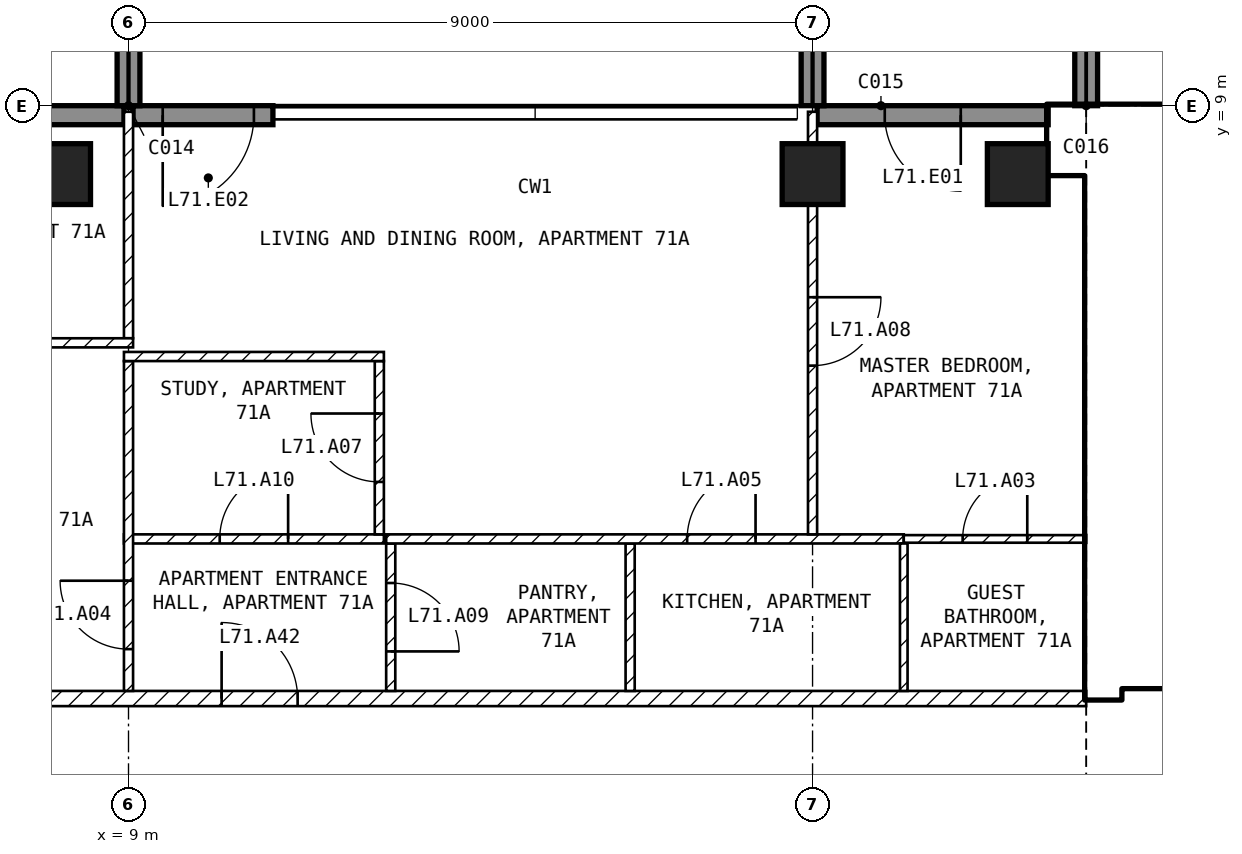
"""IFC4 building model, lengths in metres.
Left out: names, types, materials, properties, quantities, classifications, styles, units other than length and angle.
Written with IfcOpenShell. Run it as: python <this file> out.ifc"""

import sys

from ifc_helpers import new_model, si_unit, direction, frame, frame_2d, origin, origin_2d, place, context, subcontext, project, spatial, rectangle, extrude, element, fill, save


model = new_model("IFC4")
c1 = context("Model", 3, precision=1e-05, world=origin(), true_north=direction((0.0, 1.0)))
c2 = subcontext(c1, "Body", "Model", "MODEL_VIEW")
j1 = project(units=[si_unit("LENGTHUNIT", "METRE"), si_unit("PLANEANGLEUNIT", "RADIAN")], contexts=[c1])
p1 = place(None, origin())
s1 = spatial("IfcSite", under=j1, at=p1, CompositionType="ELEMENT")
p2 = place(p1, origin())
s2 = spatial("IfcBuilding", under=s1, at=p2, CompositionType="ELEMENT")
p3 = place(p2, frame((0.0, 0.0, 278.0)))
s3 = spatial("IfcBuildingStorey", under=s2, at=p3, CompositionType="ELEMENT", Elevation=278.0)
for number, where, z_axis, x_axis in (
    (1, (8.1, 8.1, -0.25), (0.0, 0.0, 1.0), (1.0, 0.0, 0.0)),
    (2, (18.0, 8.1, -0.25), (0.0, 0.0, 1.0), (1.0, 0.0, 0.0)),
    (3, (20.7, 8.1, -0.25), (0.0, 0.0, 1.0), (1.0, 0.0, 0.0)),
):
    element("IfcColumn", number, at=place(p3, frame(where, z_axis=z_axis, x_axis=x_axis)), inside=s3, PredefinedType="COLUMN", context=c2, shape_type="SweptSolid", body=[
        extrude(rectangle(XDim=0.8, YDim=0.8, at=origin_2d()), origin(), (0.0, 0.0, 1.0), 3.5),
    ])
p4 = place(p3, frame((21.1, 8.875, 0.0), z_axis=(0.0, 0.0, 1.0), x_axis=(-1.0, 0.0, 0.0)))
e4 = element("IfcWall", 4, at=p4, inside=s3, PredefinedType="SOLIDWALL", context=c2, shape_type="SweptSolid", body=[
    extrude(rectangle(XDim=3.04, YDim=0.25, at=frame_2d((1.52, 0.0))), origin(), (0.0, 0.0, 1.0), 3.25),
])
p5 = place(p4, frame((1.15, 0.0, 0.0)))
e5 = element("IfcOpeningElement", 5, at=p5, cuts=e4, PredefinedType="OPENING", context=c2, shape_type="SweptSolid", body=[
    extrude(rectangle(XDim=1.0, YDim=2.4, at=frame_2d((0.5, 1.2))), frame((0.0, 0.135, 0.0), z_axis=(0.0, -1.0, 0.0), x_axis=(1.0, 0.0, 0.0)), (0.0, 0.0, 1.0), 0.27),
])
p6 = place(p3, frame((10.9, 8.875, 0.0), z_axis=(0.0, 0.0, 1.0), x_axis=(-1.0, 0.0, 0.0)))
e6 = element("IfcWall", 6, at=p6, inside=s3, PredefinedType="SOLIDWALL", context=c2, shape_type="SweptSolid", body=[
    extrude(rectangle(XDim=1.84, YDim=0.25, at=frame_2d((0.92, 0.0))), origin(), (0.0, 0.0, 1.0), 3.25),
])
p7 = place(p6, frame((0.25, 0.0, 0.0)))
e7 = element("IfcOpeningElement", 7, at=p7, cuts=e6, PredefinedType="OPENING", context=c2, shape_type="SweptSolid", body=[
    extrude(rectangle(XDim=1.2, YDim=2.4, at=frame_2d((0.6, 1.2))), frame((0.0, 0.135, 0.0), z_axis=(0.0, -1.0, 0.0), x_axis=(1.0, 0.0, 0.0)), (0.0, 0.0, 1.0), 0.27),
])
p8 = place(p3, frame((8.94, 8.875, 0.0), z_axis=(0.0, 0.0, 1.0), x_axis=(-1.0, 0.0, 0.0)))
e8 = element("IfcWall", 8, at=p8, inside=s3, PredefinedType="SOLIDWALL", context=c2, shape_type="SweptSolid", body=[
    extrude(rectangle(XDim=3.04, YDim=0.25, at=frame_2d((1.52, 0.0))), origin(), (0.0, 0.0, 1.0), 3.25),
])
p9 = place(p8, frame((1.59, 0.0, 0.0)))
e9 = element("IfcOpeningElement", 9, at=p9, cuts=e8, PredefinedType="OPENING", context=c2, shape_type="SweptSolid", body=[
    extrude(rectangle(XDim=1.2, YDim=2.4, at=frame_2d((0.6, 1.2))), frame((0.0, 0.135, 0.0), z_axis=(0.0, -1.0, 0.0), x_axis=(1.0, 0.0, 0.0)), (0.0, 0.0, 1.0), 0.27),
])
for number, where, z_axis, x_axis in (
    (10, (9.0, 9.0, 0.0), (0.0, 0.0, 1.0), (0.0, 1.0, 0.0)),
    (11, (18.0, 9.0, 0.0), (0.0, 0.0, 1.0), (0.0, 1.0, 0.0)),
    (12, (21.6, 9.0, 0.0), (0.0, 0.0, 1.0), (0.0, 1.0, 0.0)),
):
    element("IfcWall", number, at=place(p3, frame(where, z_axis=z_axis, x_axis=x_axis)), inside=s3, PredefinedType="SOLIDWALL", context=c2, shape_type="SweptSolid", body=[
        extrude(rectangle(XDim=2.7, YDim=0.3, at=frame_2d((1.35, 0.0))), origin(), (0.0, 0.0, 1.0), 3.25),
    ])
p10 = place(p3, frame((21.1, 8.55, 0.0), z_axis=(0.0, 0.0, 1.0), x_axis=(1.0, 0.0, 0.0)))
e13 = element("IfcWall", 13, at=p10, inside=s3, PredefinedType="SHEAR", context=c2, shape_type="SweptSolid", body=[
    extrude(rectangle(XDim=8.65, YDim=0.9, at=frame_2d((4.325, 0.0))), origin(), (0.0, 0.0, 1.0), 3.25),
])
p11 = place(p3, frame((21.825, 1.2, 0.0), z_axis=(0.0, 0.0, 1.0), x_axis=(0.0, 1.0, 0.0)))
e14 = element("IfcWall", 14, at=p11, inside=s3, PredefinedType="SHEAR", context=c2, shape_type="SweptSolid", body=[
    extrude(rectangle(XDim=6.9, YDim=0.45, at=frame_2d((3.45, 0.0))), origin(), (0.0, 0.0, 1.0), 3.25),
])
p12 = place(p3, frame((22.05, 1.45, 0.0), z_axis=(0.0, 0.0, 1.0), x_axis=(1.0, 0.0, 0.0)))
e15 = element("IfcWall", 15, at=p12, inside=s3, PredefinedType="SOLIDWALL", context=c2, shape_type="SweptSolid", body=[
    extrude(rectangle(XDim=11.3, YDim=0.2, at=frame_2d((5.65, 0.0))), origin(), (0.0, 0.0, 1.0), 3.25),
])
p13 = place(p12, frame((0.75, 0.0, 0.0)))
e16 = element("IfcOpeningElement", 16, at=p13, cuts=e15, PredefinedType="OPENING", context=c2, shape_type="SweptSolid", body=[
    extrude(rectangle(XDim=1.0, YDim=2.1, at=frame_2d((0.5, 1.05))), frame((0.0, 0.11, 0.0), z_axis=(0.0, -1.0, 0.0), x_axis=(1.0, 0.0, 0.0)), (0.0, 0.0, 1.0), 0.22),
])
p14 = place(p12, frame((3.25, 0.0, 0.0)))
e17 = element("IfcOpeningElement", 17, at=p14, cuts=e15, PredefinedType="OPENING", context=c2, shape_type="SweptSolid", body=[
    extrude(rectangle(XDim=1.0, YDim=2.1, at=frame_2d((0.5, 1.05))), frame((0.0, 0.11, 0.0), z_axis=(0.0, -1.0, 0.0), x_axis=(1.0, 0.0, 0.0)), (0.0, 0.0, 1.0), 0.22),
])
p15 = place(p12, frame((9.225, 0.0, 0.0)))
e18 = element("IfcOpeningElement", 18, at=p15, cuts=e15, PredefinedType="OPENING", context=c2, shape_type="SweptSolid", body=[
    extrude(rectangle(XDim=0.9, YDim=2.1, at=frame_2d((0.45, 1.05))), frame((0.0, 0.11, 0.0), z_axis=(0.0, -1.0, 0.0), x_axis=(1.0, 0.0, 0.0)), (0.0, 0.0, 1.0), 0.22),
])
p16 = place(p3, frame((22.05, 5.15, 0.0), z_axis=(0.0, 0.0, 1.0), x_axis=(1.0, 0.0, 0.0)))
e19 = element("IfcWall", 19, at=p16, inside=s3, PredefinedType="SOLIDWALL", context=c2, shape_type="SweptSolid", body=[
    extrude(rectangle(XDim=6.3, YDim=0.2, at=frame_2d((3.15, 0.0))), origin(), (0.0, 0.0, 1.0), 3.25),
])
p17 = place(p16, frame((0.2, 0.0, 0.0)))
e20 = element("IfcOpeningElement", 20, at=p17, cuts=e19, PredefinedType="OPENING", context=c2, shape_type="SweptSolid", body=[
    extrude(rectangle(XDim=1.0, YDim=2.1, at=frame_2d((0.5, 1.05))), frame((0.0, 0.11, 0.0), z_axis=(0.0, -1.0, 0.0), x_axis=(1.0, 0.0, 0.0)), (0.0, 0.0, 1.0), 0.22),
])
p18 = place(p3, frame((4.4, 1.2, 0.0), z_axis=(0.0, 0.0, 1.0), x_axis=(1.0, 0.0, 0.0)))
e21 = element("IfcWall", 21, at=p18, inside=s3, PredefinedType="PARTITIONING", context=c2, shape_type="SweptSolid", body=[
    extrude(rectangle(XDim=17.2, YDim=0.2, at=frame_2d((8.6, 0.0))), origin(), (0.0, 0.0, 1.0), 3.25),
])
p19 = place(p18, frame((5.825, 0.0, 0.0)))
e22 = element("IfcOpeningElement", 22, at=p19, cuts=e21, PredefinedType="OPENING", context=c2, shape_type="SweptSolid", body=[
    extrude(rectangle(XDim=1.0, YDim=2.1, at=frame_2d((0.5, 1.05))), frame((0.0, 0.11, 0.0), z_axis=(0.0, -1.0, 0.0), x_axis=(1.0, 0.0, 0.0)), (0.0, 0.0, 1.0), 0.22),
])
p20 = place(p3, frame((12.45, 3.24, 0.0), z_axis=(0.0, 0.0, 1.0), x_axis=(0.0, -1.0, 0.0)))
e23 = element("IfcWall", 23, at=p20, inside=s3, PredefinedType="PARTITIONING", context=c2, shape_type="SweptSolid", body=[
    extrude(rectangle(XDim=1.94, YDim=0.12, at=frame_2d((0.97, 0.0))), origin(), (0.0, 0.0, 1.0), 3.25),
])
p21 = place(p20, frame((0.52, 0.0, 0.0)))
e24 = element("IfcOpeningElement", 24, at=p21, cuts=e23, PredefinedType="OPENING", context=c2, shape_type="SweptSolid", body=[
    extrude(rectangle(XDim=0.9, YDim=2.1, at=frame_2d((0.45, 1.05))), frame((0.0, 0.07, 0.0), z_axis=(0.0, -1.0, 0.0), x_axis=(1.0, 0.0, 0.0)), (0.0, 0.0, 1.0), 0.14),
])
p22 = place(p3, frame((8.94, 3.3, 0.0), z_axis=(0.0, 0.0, 1.0), x_axis=(1.0, 0.0, 0.0)))
e25 = element("IfcWall", 25, at=p22, inside=s3, PredefinedType="PARTITIONING", context=c2, shape_type="SweptSolid", body=[
    extrude(rectangle(XDim=3.42, YDim=0.12, at=frame_2d((1.71, 0.0))), origin(), (0.0, 0.0, 1.0), 3.25),
])
p23 = place(p22, frame((1.26, 0.0, 0.0)))
e26 = element("IfcOpeningElement", 26, at=p23, cuts=e25, PredefinedType="OPENING", context=c2, shape_type="SweptSolid", body=[
    extrude(rectangle(XDim=0.9, YDim=2.1, at=frame_2d((0.45, 1.05))), frame((0.0, 0.07, 0.0), z_axis=(0.0, -1.0, 0.0), x_axis=(1.0, 0.0, 0.0)), (0.0, 0.0, 1.0), 0.14),
])
p24 = place(p3, frame((9.0, 1.3, 0.0), z_axis=(0.0, 0.0, 1.0), x_axis=(0.0, 1.0, 0.0)))
e27 = element("IfcWall", 27, at=p24, inside=s3, PredefinedType="PARTITIONING", context=c2, shape_type="SweptSolid", body=[
    extrude(rectangle(XDim=4.34, YDim=0.12, at=frame_2d((2.17, 0.0))), origin(), (0.0, 0.0, 1.0), 3.25),
])
p25 = place(p24, frame((0.55, 0.0, 0.0)))
e28 = element("IfcOpeningElement", 28, at=p25, cuts=e27, PredefinedType="OPENING", context=c2, shape_type="SweptSolid", body=[
    extrude(rectangle(XDim=0.9, YDim=2.1, at=frame_2d((0.45, 1.05))), frame((0.0, 0.07, 0.0), z_axis=(0.0, -1.0, 0.0), x_axis=(1.0, 0.0, 0.0)), (0.0, 0.0, 1.0), 0.14),
])
p26 = place(p3, frame((15.6, 3.24, 0.0), z_axis=(0.0, 0.0, 1.0), x_axis=(0.0, -1.0, 0.0)))
e29 = element("IfcWall", 29, at=p26, inside=s3, PredefinedType="PARTITIONING", context=c2, shape_type="SweptSolid", body=[
    extrude(rectangle(XDim=1.94, YDim=0.12, at=frame_2d((0.97, 0.0))), origin(), (0.0, 0.0, 1.0), 3.25),
])
p27 = place(p3, frame((12.39, 3.3, 0.0), z_axis=(0.0, 0.0, 1.0), x_axis=(1.0, 0.0, 0.0)))
e30 = element("IfcWall", 30, at=p27, inside=s3, PredefinedType="PARTITIONING", context=c2, shape_type="SweptSolid", body=[
    extrude(rectangle(XDim=6.81, YDim=0.12, at=frame_2d((3.405, 0.0))), origin(), (0.0, 0.0, 1.0), 3.25),
])
p28 = place(p27, frame((3.96, 0.0, 0.0)))
e31 = element("IfcOpeningElement", 31, at=p28, cuts=e30, PredefinedType="OPENING", context=c2, shape_type="SweptSolid", body=[
    extrude(rectangle(XDim=0.9, YDim=2.1, at=frame_2d((0.45, 1.05))), frame((0.0, 0.07, 0.0), z_axis=(0.0, -1.0, 0.0), x_axis=(1.0, 0.0, 0.0)), (0.0, 0.0, 1.0), 0.14),
])
p29 = place(p3, frame((19.2, 3.24, 0.0), z_axis=(0.0, 0.0, 1.0), x_axis=(0.0, -1.0, 0.0)))
e32 = element("IfcWall", 32, at=p29, inside=s3, PredefinedType="PARTITIONING", context=c2, shape_type="SweptSolid", body=[
    extrude(rectangle(XDim=1.94, YDim=0.1, at=frame_2d((0.97, 0.0))), origin(), (0.0, 0.0, 1.0), 3.25),
])
p30 = place(p3, frame((19.2, 3.3, 0.0), z_axis=(0.0, 0.0, 1.0), x_axis=(1.0, 0.0, 0.0)))
e33 = element("IfcWall", 33, at=p30, inside=s3, PredefinedType="PARTITIONING", context=c2, shape_type="SweptSolid", body=[
    extrude(rectangle(XDim=2.4, YDim=0.1, at=frame_2d((1.2, 0.0))), origin(), (0.0, 0.0, 1.0), 3.25),
])
p31 = place(p30, frame((0.775, 0.0, 0.0)))
e34 = element("IfcOpeningElement", 34, at=p31, cuts=e33, PredefinedType="OPENING", context=c2, shape_type="SweptSolid", body=[
    extrude(rectangle(XDim=0.85, YDim=2.1, at=frame_2d((0.425, 1.05))), frame((0.0, 0.06, 0.0), z_axis=(0.0, -1.0, 0.0), x_axis=(1.0, 0.0, 0.0)), (0.0, 0.0, 1.0), 0.12),
])
p32 = place(p3, frame((12.3, 3.36, 0.0), z_axis=(0.0, 0.0, 1.0), x_axis=(0.0, 1.0, 0.0)))
e35 = element("IfcWall", 35, at=p32, inside=s3, PredefinedType="PARTITIONING", context=c2, shape_type="SweptSolid", body=[
    extrude(rectangle(XDim=2.28, YDim=0.12, at=frame_2d((1.14, 0.0))), origin(), (0.0, 0.0, 1.0), 3.25),
])
p33 = place(p32, frame((0.69, 0.0, 0.0)))
e36 = element("IfcOpeningElement", 36, at=p33, cuts=e35, PredefinedType="OPENING", context=c2, shape_type="SweptSolid", body=[
    extrude(rectangle(XDim=0.9, YDim=2.1, at=frame_2d((0.45, 1.05))), frame((0.0, 0.07, 0.0), z_axis=(0.0, -1.0, 0.0), x_axis=(1.0, 0.0, 0.0)), (0.0, 0.0, 1.0), 0.14),
])
p34 = place(p3, frame((12.36, 5.7, 0.0), z_axis=(0.0, 0.0, 1.0), x_axis=(-1.0, 0.0, 0.0)))
e37 = element("IfcWall", 37, at=p34, inside=s3, PredefinedType="PARTITIONING", context=c2, shape_type="SweptSolid", body=[
    extrude(rectangle(XDim=3.42, YDim=0.12, at=frame_2d((1.71, 0.0))), origin(), (0.0, 0.0, 1.0), 3.25),
])
p35 = place(p3, frame((18.0, 8.92, 0.0), z_axis=(0.0, 0.0, 1.0), x_axis=(0.0, -1.0, 0.0)))
e38 = element("IfcWall", 38, at=p35, inside=s3, PredefinedType="PARTITIONING", context=c2, shape_type="SweptSolid", body=[
    extrude(rectangle(XDim=5.56, YDim=0.12, at=frame_2d((2.78, 0.0))), origin(), (0.0, 0.0, 1.0), 2.496),
])
p36 = place(p35, frame((2.44, 0.0, 0.0)))
e39 = element("IfcOpeningElement", 39, at=p36, cuts=e38, PredefinedType="OPENING", context=c2, shape_type="SweptSolid", body=[
    extrude(rectangle(XDim=0.9, YDim=2.1, at=frame_2d((0.45, 1.05))), frame((0.0, 0.07, 0.0), z_axis=(0.0, -1.0, 0.0), x_axis=(1.0, 0.0, 0.0)), (0.0, 0.0, 1.0), 0.14),
])
p37 = place(p3, frame((9.0, 5.94, 0.0), z_axis=(0.0, 0.0, 1.0), x_axis=(0.0, 1.0, 0.0)))
e40 = element("IfcWall", 40, at=p37, inside=s3, PredefinedType="PARTITIONING", context=c2, shape_type="SweptSolid", body=[
    extrude(rectangle(XDim=2.98, YDim=0.12, at=frame_2d((1.49, 0.0))), origin(), (0.0, 0.0, 1.0), 3.25),
])
p38 = place(p3, frame((4.44, 5.88, 0.0), z_axis=(0.0, 0.0, 1.0), x_axis=(1.0, 0.0, 0.0)))
e41 = element("IfcWall", 41, at=p38, inside=s3, PredefinedType="PARTITIONING", context=c2, shape_type="SweptSolid", body=[
    extrude(rectangle(XDim=4.62, YDim=0.12, at=frame_2d((2.31, 0.0))), origin(), (0.0, 0.0, 1.0), 3.25),
])
p39 = place(p38, frame((1.86, 0.0, 0.0)))
e42 = element("IfcOpeningElement", 42, at=p39, cuts=e41, PredefinedType="OPENING", context=c2, shape_type="SweptSolid", body=[
    extrude(rectangle(XDim=0.9, YDim=2.1, at=frame_2d((0.45, 1.05))), frame((0.0, 0.07, 0.0), z_axis=(0.0, -1.0, 0.0), x_axis=(1.0, 0.0, 0.0)), (0.0, 0.0, 1.0), 0.14),
])
p40 = place(p5, origin())
e43 = element("IfcDoor", 43, at=p40, inside=s3, OperationType="SINGLE_SWING_LEFT", PredefinedType="DOOR", context=c2, shape_type="SweptSolid", body=[
    extrude(rectangle(XDim=1.0, YDim=2.4, at=frame_2d((0.5, 1.2))), frame((0.0, 0.025, 0.0), z_axis=(0.0, -1.0, 0.0), x_axis=(1.0, 0.0, 0.0)), (0.0, 0.0, 1.0), 0.05),
])
fill(e5, e43)
p41 = place(p7, origin())
e44 = element("IfcDoor", 44, at=p41, inside=s3, OperationType="SINGLE_SWING_RIGHT", PredefinedType="DOOR", context=c2, shape_type="SweptSolid", body=[
    extrude(rectangle(XDim=1.2, YDim=2.4, at=frame_2d((0.6, 1.2))), frame((0.0, 0.025, 0.0), z_axis=(0.0, -1.0, 0.0), x_axis=(1.0, 0.0, 0.0)), (0.0, 0.0, 1.0), 0.05),
])
fill(e7, e44)
p42 = place(p17, origin())
e45 = element("IfcDoor", 45, at=p42, inside=s3, OperationType="SINGLE_SWING_LEFT", PredefinedType="DOOR", context=c2, shape_type="SweptSolid", body=[
    extrude(rectangle(XDim=1.0, YDim=2.1, at=frame_2d((0.5, 1.05))), frame((0.0, 0.025, 0.0), z_axis=(0.0, -1.0, 0.0), x_axis=(1.0, 0.0, 0.0)), (0.0, 0.0, 1.0), 0.05),
])
fill(e20, e45)
p43 = place(p31, origin())
e46 = element("IfcDoor", 46, at=p43, inside=s3, OperationType="SINGLE_SWING_RIGHT", PredefinedType="DOOR", context=c2, shape_type="SweptSolid", body=[
    extrude(rectangle(XDim=0.85, YDim=2.1, at=frame_2d((0.425, 1.05))), frame((0.0, 0.025, 0.0), z_axis=(0.0, -1.0, 0.0), x_axis=(1.0, 0.0, 0.0)), (0.0, 0.0, 1.0), 0.05),
])
fill(e34, e46)
p44 = place(p25, origin())
e47 = element("IfcDoor", 47, at=p44, inside=s3, OperationType="SINGLE_SWING_RIGHT", PredefinedType="DOOR", context=c2, shape_type="SweptSolid", body=[
    extrude(rectangle(XDim=0.9, YDim=2.1, at=frame_2d((0.45, 1.05))), frame((0.0, 0.025, 0.0), z_axis=(0.0, -1.0, 0.0), x_axis=(1.0, 0.0, 0.0)), (0.0, 0.0, 1.0), 0.05),
])
fill(e28, e47)
p45 = place(p28, origin())
e48 = element("IfcDoor", 48, at=p45, inside=s3, OperationType="SINGLE_SWING_RIGHT", PredefinedType="DOOR", context=c2, shape_type="SweptSolid", body=[
    extrude(rectangle(XDim=0.9, YDim=2.1, at=frame_2d((0.45, 1.05))), frame((0.0, 0.025, 0.0), z_axis=(0.0, -1.0, 0.0), x_axis=(1.0, 0.0, 0.0)), (0.0, 0.0, 1.0), 0.05),
])
fill(e31, e48)
p46 = place(p33, origin())
e49 = element("IfcDoor", 49, at=p46, inside=s3, OperationType="SINGLE_SWING_RIGHT", PredefinedType="DOOR", context=c2, shape_type="SweptSolid", body=[
    extrude(rectangle(XDim=0.9, YDim=2.1, at=frame_2d((0.45, 1.05))), frame((0.0, 0.025, 0.0), z_axis=(0.0, -1.0, 0.0), x_axis=(1.0, 0.0, 0.0)), (0.0, 0.0, 1.0), 0.05),
])
fill(e36, e49)
p47 = place(p36, origin())
e50 = element("IfcDoor", 50, at=p47, inside=s3, OperationType="SINGLE_SWING_LEFT", PredefinedType="DOOR", context=c2, shape_type="SweptSolid", body=[
    extrude(rectangle(XDim=0.9, YDim=2.1, at=frame_2d((0.45, 1.05))), frame((0.0, 0.025, 0.0), z_axis=(0.0, -1.0, 0.0), x_axis=(1.0, 0.0, 0.0)), (0.0, 0.0, 1.0), 0.05),
])
fill(e39, e50)
p48 = place(p21, origin())
e51 = element("IfcDoor", 51, at=p48, inside=s3, OperationType="SINGLE_SWING_RIGHT", PredefinedType="DOOR", context=c2, shape_type="SweptSolid", body=[
    extrude(rectangle(XDim=0.9, YDim=2.1, at=frame_2d((0.45, 1.05))), frame((0.0, 0.025, 0.0), z_axis=(0.0, -1.0, 0.0), x_axis=(1.0, 0.0, 0.0)), (0.0, 0.0, 1.0), 0.05),
])
fill(e24, e51)
p49 = place(p23, origin())
e52 = element("IfcDoor", 52, at=p49, inside=s3, OperationType="SINGLE_SWING_RIGHT", PredefinedType="DOOR", context=c2, shape_type="SweptSolid", body=[
    extrude(rectangle(XDim=0.9, YDim=2.1, at=frame_2d((0.45, 1.05))), frame((0.0, 0.025, 0.0), z_axis=(0.0, -1.0, 0.0), x_axis=(1.0, 0.0, 0.0)), (0.0, 0.0, 1.0), 0.05),
])
fill(e26, e52)
p50 = place(p19, origin())
e53 = element("IfcDoor", 53, at=p50, inside=s3, OperationType="SINGLE_SWING_LEFT", PredefinedType="DOOR", context=c2, shape_type="SweptSolid", body=[
    extrude(rectangle(XDim=1.0, YDim=2.1, at=frame_2d((0.5, 1.05))), frame((0.0, 0.025, 0.0), z_axis=(0.0, -1.0, 0.0), x_axis=(1.0, 0.0, 0.0)), (0.0, 0.0, 1.0), 0.05),
])
fill(e22, e53)
save(model, sys.argv[1])
